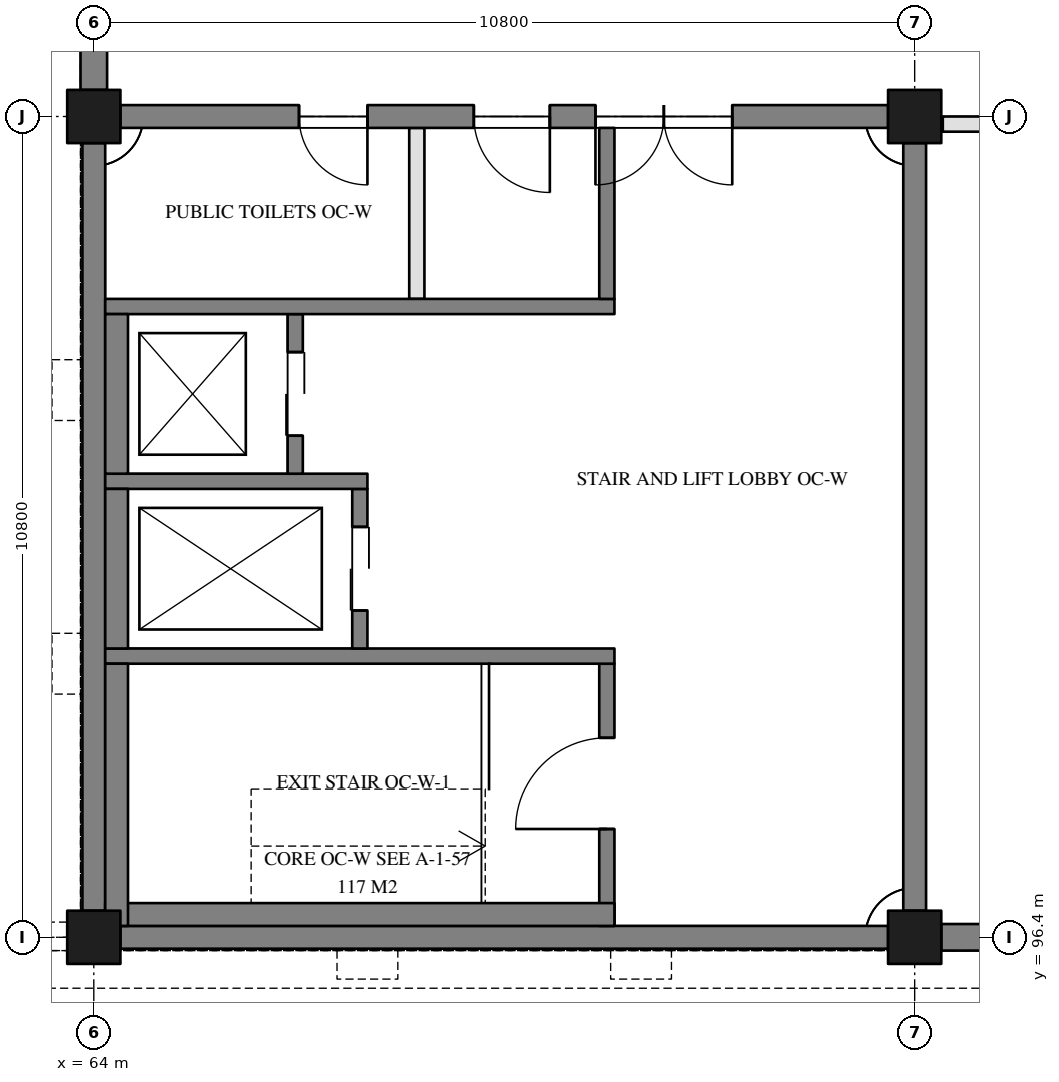
"""IFC4 building model, lengths in metres.
Left out: names, types, materials, properties, quantities, classifications, styles, units other than length and angle.
Written with IfcOpenShell. Run it as: python <this file> out.ifc"""

import sys

from ifc_helpers import new_model, si_unit, direction, frame, frame_2d, origin, origin_2d, place, context, subcontext, project, spatial, rectangle, extrude, element, fill, save


model = new_model("IFC4")
c1 = context("Model", 3, precision=1e-05, world=origin(), true_north=direction((0.0, 1.0)))
c2 = subcontext(c1, "Body", "Model", "MODEL_VIEW")
j1 = project(units=[si_unit("LENGTHUNIT", "METRE"), si_unit("PLANEANGLEUNIT", "RADIAN")], contexts=[c1])
p1 = place(None, origin())
s1 = spatial("IfcSite", under=j1, at=p1, CompositionType="ELEMENT")
p2 = place(p1, origin())
s2 = spatial("IfcBuilding", under=s1, at=p2, CompositionType="ELEMENT")
p3 = place(p2, frame((0.0, 0.0, 24.3)))
s3 = spatial("IfcBuildingStorey", under=s2, at=p3, CompositionType="ELEMENT", Elevation=24.3)
for number, where, z_axis, x_axis in (
    (1, (64.0, 96.4, 0.0), (0.0, 0.0, 1.0), (1.0, 0.0, 0.0)),
    (2, (64.0, 107.2, 0.0), (0.0, 0.0, 1.0), (1.0, 0.0, 0.0)),
    (3, (74.8, 96.4, 0.0), (0.0, 0.0, 1.0), (1.0, 0.0, 0.0)),
    (4, (74.8, 107.2, 0.0), (0.0, 0.0, 1.0), (1.0, 0.0, 0.0)),
):
    element("IfcColumn", number, at=place(p3, frame(where, z_axis=z_axis, x_axis=x_axis)), inside=s3, PredefinedType="COLUMN", context=c2, shape_type="SweptSolid", body=[
        extrude(rectangle(XDim=0.7, YDim=0.7, at=origin_2d()), origin(), (0.0, 0.0, 1.0), 3.9),
    ])
p4 = place(p3, frame((64.35, 96.4, 0.0), z_axis=(0.0, 0.0, 1.0), x_axis=(1.0, 0.0, 0.0)))
e5 = element("IfcWall", 5, at=p4, inside=s3, PredefinedType="SOLIDWALL", context=c2, shape_type="SweptSolid", body=[
    extrude(rectangle(XDim=10.1, YDim=0.3, at=frame_2d((5.05, 0.0))), origin(), (0.0, 0.0, 1.0), 3.9),
])
p5 = place(p3, frame((74.8, 96.75, 0.0), z_axis=(0.0, 0.0, 1.0), x_axis=(0.0, 1.0, 0.0)))
e6 = element("IfcWall", 6, at=p5, inside=s3, PredefinedType="SOLIDWALL", context=c2, shape_type="SweptSolid", body=[
    extrude(rectangle(XDim=10.1, YDim=0.3, at=frame_2d((5.05, 0.0))), origin(), (0.0, 0.0, 1.0), 3.9),
])
p6 = place(p3, frame((74.45, 107.2, 0.0), z_axis=(0.0, 0.0, 1.0), x_axis=(-1.0, 0.0, 0.0)))
e7 = element("IfcWall", 7, at=p6, inside=s3, PredefinedType="SOLIDWALL", context=c2, shape_type="SweptSolid", body=[
    extrude(rectangle(XDim=10.1, YDim=0.3, at=frame_2d((5.05, 0.0))), origin(), (0.0, 0.0, 1.0), 3.9),
])
p7 = place(p6, frame((2.05, 0.0, 0.0)))
e8 = element("IfcOpeningElement", 8, at=p7, cuts=e7, PredefinedType="OPENING", context=c2, shape_type="SweptSolid", body=[
    extrude(rectangle(XDim=1.8, YDim=2.1, at=frame_2d((0.9, 1.05))), frame((0.0, 0.16, 0.0), z_axis=(0.0, -1.0, 0.0), x_axis=(1.0, 0.0, 0.0)), (0.0, 0.0, 1.0), 0.32),
])
p8 = place(p6, frame((4.45, 0.0, 0.0)))
e9 = element("IfcOpeningElement", 9, at=p8, cuts=e7, PredefinedType="OPENING", context=c2, shape_type="SweptSolid", body=[
    extrude(rectangle(XDim=1.0, YDim=2.1, at=frame_2d((0.5, 1.05))), frame((0.0, 0.16, 0.0), z_axis=(0.0, -1.0, 0.0), x_axis=(1.0, 0.0, 0.0)), (0.0, 0.0, 1.0), 0.32),
])
p9 = place(p6, frame((6.85, 0.0, 0.0)))
e10 = element("IfcOpeningElement", 10, at=p9, cuts=e7, PredefinedType="OPENING", context=c2, shape_type="SweptSolid", body=[
    extrude(rectangle(XDim=0.9, YDim=2.1, at=frame_2d((0.45, 1.05))), frame((0.0, 0.16, 0.0), z_axis=(0.0, -1.0, 0.0), x_axis=(1.0, 0.0, 0.0)), (0.0, 0.0, 1.0), 0.32),
])
p10 = place(p3, frame((64.0, 106.85, 0.0), z_axis=(0.0, 0.0, 1.0), x_axis=(0.0, -1.0, 0.0)))
e11 = element("IfcWall", 11, at=p10, inside=s3, PredefinedType="SOLIDWALL", context=c2, shape_type="SweptSolid", body=[
    extrude(rectangle(XDim=10.1, YDim=0.3, at=frame_2d((5.05, 0.0))), origin(), (0.0, 0.0, 1.0), 3.9),
])
p11 = place(p3, frame((75.15, 96.4, 0.0), z_axis=(0.0, 0.0, 1.0), x_axis=(1.0, 0.0, 0.0)))
e12 = element("IfcWall", 12, at=p11, inside=s3, PredefinedType="SOLIDWALL", context=c2, shape_type="SweptSolid", body=[
    extrude(rectangle(XDim=10.1, YDim=0.35, at=frame_2d((5.05, 0.0))), origin(), (0.0, 0.0, 1.0), 2.95),
])
p12 = place(p11, frame((0.85, 0.0, 0.9)))
e13 = element("IfcOpeningElement", 13, at=p12, cuts=e12, PredefinedType="OPENING", context=c2, shape_type="SweptSolid", body=[
    extrude(rectangle(XDim=1.2, YDim=1.2, at=frame_2d((0.6, 0.6))), frame((0.0, 0.185, 0.0), z_axis=(0.0, -1.0, 0.0), x_axis=(1.0, 0.0, 0.0)), (0.0, 0.0, 1.0), 0.37),
])
p13 = place(p11, frame((4.45, 0.0, 0.9)))
e14 = element("IfcOpeningElement", 14, at=p13, cuts=e12, PredefinedType="OPENING", context=c2, shape_type="SweptSolid", body=[
    extrude(rectangle(XDim=1.2, YDim=1.2, at=frame_2d((0.6, 0.6))), frame((0.0, 0.185, 0.0), z_axis=(0.0, -1.0, 0.0), x_axis=(1.0, 0.0, 0.0)), (0.0, 0.0, 1.0), 0.37),
])
p14 = place(p11, frame((8.05, 0.0, 0.9)))
e15 = element("IfcOpeningElement", 15, at=p14, cuts=e12, PredefinedType="OPENING", context=c2, shape_type="SweptSolid", body=[
    extrude(rectangle(XDim=1.2, YDim=1.2, at=frame_2d((0.6, 0.6))), frame((0.0, 0.185, 0.0), z_axis=(0.0, -1.0, 0.0), x_axis=(1.0, 0.0, 0.0)), (0.0, 0.0, 1.0), 0.37),
])
p15 = place(p3, frame((64.0, 107.55, 0.0), z_axis=(0.0, 0.0, 1.0), x_axis=(0.0, 1.0, 0.0)))
e16 = element("IfcWall", 16, at=p15, inside=s3, PredefinedType="SOLIDWALL", context=c2, shape_type="SweptSolid", body=[
    extrude(rectangle(XDim=3.85, YDim=0.35, at=frame_2d((1.925, 0.0))), origin(), (0.0, 0.0, 1.0), 2.95),
])
p16 = place(p15, frame((0.85, 0.0, 0.9)))
e17 = element("IfcOpeningElement", 17, at=p16, cuts=e16, PredefinedType="OPENING", context=c2, shape_type="SweptSolid", body=[
    extrude(rectangle(XDim=1.2, YDim=1.2, at=frame_2d((0.6, 0.6))), frame((0.0, 0.185, 0.0), z_axis=(0.0, -1.0, 0.0), x_axis=(1.0, 0.0, 0.0)), (0.0, 0.0, 1.0), 0.37),
])
p17 = place(p3, frame((70.75, 96.55, 0.0), z_axis=(0.0, 0.0, 1.0), x_axis=(0.0, 1.0, 0.0)))
e18 = element("IfcWall", 18, at=p17, inside=s3, PredefinedType="SOLIDWALL", context=c2, shape_type="SweptSolid", body=[
    extrude(rectangle(XDim=3.45, YDim=0.2, at=frame_2d((1.725, 0.0))), origin(), (0.0, 0.0, 1.0), 3.9),
])
p18 = place(p17, frame((1.275, 0.0, 0.0)))
e19 = element("IfcOpeningElement", 19, at=p18, cuts=e18, PredefinedType="OPENING", context=c2, shape_type="SweptSolid", body=[
    extrude(rectangle(XDim=1.2, YDim=2.1, at=frame_2d((0.6, 1.05))), frame((0.0, 0.11, 0.0), z_axis=(0.0, -1.0, 0.0), x_axis=(1.0, 0.0, 0.0)), (0.0, 0.0, 1.0), 0.22),
])
p19 = place(p3, frame((70.85, 100.1, 0.0), z_axis=(0.0, 0.0, 1.0), x_axis=(-1.0, 0.0, 0.0)))
e20 = element("IfcWall", 20, at=p19, inside=s3, PredefinedType="SOLIDWALL", context=c2, shape_type="SweptSolid", body=[
    extrude(rectangle(XDim=6.7, YDim=0.2, at=frame_2d((3.35, 0.0))), origin(), (0.0, 0.0, 1.0), 3.9),
])
p20 = place(p3, frame((67.5, 100.2, 0.0), z_axis=(0.0, 0.0, 1.0), x_axis=(0.0, 1.0, 0.0)))
e21 = element("IfcWall", 21, at=p20, inside=s3, PredefinedType="SOLIDWALL", context=c2, shape_type="SweptSolid", body=[
    extrude(rectangle(XDim=2.1, YDim=0.2, at=frame_2d((1.05, 0.0))), origin(), (0.0, 0.0, 1.0), 3.9),
])
p21 = place(p20, frame((0.5, 0.0, 0.0)))
e22 = element("IfcOpeningElement", 22, at=p21, cuts=e21, PredefinedType="OPENING", context=c2, shape_type="SweptSolid", body=[
    extrude(rectangle(XDim=1.1, YDim=2.1, at=frame_2d((0.55, 1.05))), frame((0.0, 0.11, 0.0), z_axis=(0.0, -1.0, 0.0), x_axis=(1.0, 0.0, 0.0)), (0.0, 0.0, 1.0), 0.22),
])
p22 = place(p3, frame((67.6, 102.4, 0.0), z_axis=(0.0, 0.0, 1.0), x_axis=(-1.0, 0.0, 0.0)))
e23 = element("IfcWall", 23, at=p22, inside=s3, PredefinedType="SOLIDWALL", context=c2, shape_type="SweptSolid", body=[
    extrude(rectangle(XDim=3.45, YDim=0.2, at=frame_2d((1.725, 0.0))), origin(), (0.0, 0.0, 1.0), 3.9),
])
p23 = place(p3, frame((66.65, 102.5, 0.0), z_axis=(0.0, 0.0, 1.0), x_axis=(0.0, 1.0, 0.0)))
e24 = element("IfcWall", 24, at=p23, inside=s3, PredefinedType="SOLIDWALL", context=c2, shape_type="SweptSolid", body=[
    extrude(rectangle(XDim=2.1, YDim=0.2, at=frame_2d((1.05, 0.0))), origin(), (0.0, 0.0, 1.0), 3.9),
])
p24 = place(p23, frame((0.5, 0.0, 0.0)))
e25 = element("IfcOpeningElement", 25, at=p24, cuts=e24, PredefinedType="OPENING", context=c2, shape_type="SweptSolid", body=[
    extrude(rectangle(XDim=1.1, YDim=2.1, at=frame_2d((0.55, 1.05))), frame((0.0, 0.11, 0.0), z_axis=(0.0, -1.0, 0.0), x_axis=(1.0, 0.0, 0.0)), (0.0, 0.0, 1.0), 0.22),
])
p25 = place(p3, frame((70.85, 104.7, 0.0), z_axis=(0.0, 0.0, 1.0), x_axis=(-1.0, 0.0, 0.0)))
e26 = element("IfcWall", 26, at=p25, inside=s3, PredefinedType="SOLIDWALL", context=c2, shape_type="SweptSolid", body=[
    extrude(rectangle(XDim=6.7, YDim=0.2, at=frame_2d((3.35, 0.0))), origin(), (0.0, 0.0, 1.0), 3.9),
])
p26 = place(p3, frame((70.75, 104.8, 0.0), z_axis=(0.0, 0.0, 1.0), x_axis=(0.0, 1.0, 0.0)))
e27 = element("IfcWall", 27, at=p26, inside=s3, PredefinedType="SOLIDWALL", context=c2, shape_type="SweptSolid", body=[
    extrude(rectangle(XDim=2.25, YDim=0.2, at=frame_2d((1.125, 0.0))), origin(), (0.0, 0.0, 1.0), 3.9),
])
p27 = place(p3, frame((70.85, 96.7, -0.3), z_axis=(0.0, 0.0, 1.0), x_axis=(-1.0, 0.0, 0.0)))
e28 = element("IfcWall", 28, at=p27, inside=s3, PredefinedType="SOLIDWALL", context=c2, shape_type="SweptSolid", body=[
    extrude(rectangle(XDim=6.7, YDim=0.3, at=frame_2d((3.35, 0.0))), origin(), (0.0, 0.0, 1.0), 4.2),
])
p28 = place(p3, frame((64.3, 96.55, -0.3), z_axis=(0.0, 0.0, 1.0), x_axis=(0.0, 1.0, 0.0)))
e29 = element("IfcWall", 29, at=p28, inside=s3, PredefinedType="SOLIDWALL", context=c2, shape_type="SweptSolid", body=[
    extrude(rectangle(XDim=3.45, YDim=0.3, at=frame_2d((1.725, 0.0))), origin(), (0.0, 0.0, 1.0), 4.2),
])
for number, where, z_axis, x_axis in (
    (30, (64.3, 100.2, -0.3), (0.0, 0.0, 1.0), (0.0, 1.0, 0.0)),
    (31, (64.3, 102.5, -0.3), (0.0, 0.0, 1.0), (0.0, 1.0, 0.0)),
):
    element("IfcWall", number, at=place(p3, frame(where, z_axis=z_axis, x_axis=x_axis)), inside=s3, PredefinedType="SOLIDWALL", context=c2, shape_type="SweptSolid", body=[
        extrude(rectangle(XDim=2.1, YDim=0.3, at=frame_2d((1.05, 0.0))), origin(), (0.0, 0.0, 1.0), 4.2),
    ])
p29 = place(p3, frame((68.25, 104.8, 0.0), z_axis=(0.0, 0.0, 1.0), x_axis=(0.0, 1.0, 0.0)))
e32 = element("IfcWall", 32, at=p29, inside=s3, PredefinedType="PARTITIONING", context=c2, shape_type="SweptSolid", body=[
    extrude(rectangle(XDim=2.25, YDim=0.2, at=frame_2d((1.125, 0.0))), origin(), (0.0, 0.0, 1.0), 3.9),
])
p30 = place(p3, frame((75.17, 107.1, 0.0), z_axis=(0.0, 0.0, 1.0), x_axis=(1.0, 0.0, 0.0)))
e33 = element("IfcWall", 33, at=p30, inside=s3, PredefinedType="PARTITIONING", context=c2, shape_type="SweptSolid", body=[
    extrude(rectangle(XDim=10.06, YDim=0.2, at=frame_2d((5.03, 0.0))), origin(), (0.0, 0.0, 1.0), 3.75),
])
p31 = place(p21, frame((1.1, 0.0, 0.0), z_axis=(0.0, 0.0, 1.0), x_axis=(-1.0, 0.0, 0.0)))
e34 = element("IfcDoor", 34, at=p31, inside=s3, OperationType="DOUBLE_DOOR_SLIDING", PredefinedType="DOOR", context=c2, shape_type="SweptSolid", body=[
    extrude(rectangle(XDim=1.1, YDim=2.1, at=frame_2d((0.55, 1.05))), frame((0.0, 0.025, 0.0), z_axis=(0.0, -1.0, 0.0), x_axis=(1.0, 0.0, 0.0)), (0.0, 0.0, 1.0), 0.05),
])
fill(e22, e34)
p32 = place(p24, frame((1.1, 0.0, 0.0), z_axis=(0.0, 0.0, 1.0), x_axis=(-1.0, 0.0, 0.0)))
e35 = element("IfcDoor", 35, at=p32, inside=s3, OperationType="DOUBLE_DOOR_SLIDING", PredefinedType="DOOR", context=c2, shape_type="SweptSolid", body=[
    extrude(rectangle(XDim=1.1, YDim=2.1, at=frame_2d((0.55, 1.05))), frame((0.0, 0.025, 0.0), z_axis=(0.0, -1.0, 0.0), x_axis=(1.0, 0.0, 0.0)), (0.0, 0.0, 1.0), 0.05),
])
fill(e25, e35)
p33 = place(p18, frame((1.2, 0.0, 0.0), z_axis=(0.0, 0.0, 1.0), x_axis=(-1.0, 0.0, 0.0)))
e36 = element("IfcDoor", 36, at=p33, inside=s3, OperationType="SINGLE_SWING_LEFT", PredefinedType="DOOR", context=c2, shape_type="SweptSolid", body=[
    extrude(rectangle(XDim=1.2, YDim=2.1, at=frame_2d((0.6, 1.05))), frame((0.0, 0.025, 0.0), z_axis=(0.0, -1.0, 0.0), x_axis=(1.0, 0.0, 0.0)), (0.0, 0.0, 1.0), 0.05),
])
fill(e19, e36)
p34 = place(p7, frame((1.8, 0.0, 0.0), z_axis=(0.0, 0.0, 1.0), x_axis=(-1.0, 0.0, 0.0)))
e37 = element("IfcDoor", 37, at=p34, inside=s3, OperationType="DOUBLE_DOOR_DOUBLE_SWING", PredefinedType="DOOR", context=c2, shape_type="SweptSolid", body=[
    extrude(rectangle(XDim=1.8, YDim=2.1, at=frame_2d((0.9, 1.05))), frame((0.0, 0.025, 0.0), z_axis=(0.0, -1.0, 0.0), x_axis=(1.0, 0.0, 0.0)), (0.0, 0.0, 1.0), 0.05),
])
fill(e8, e37)
p35 = place(p8, origin())
e38 = element("IfcDoor", 38, at=p35, inside=s3, OperationType="SINGLE_SWING_LEFT", PredefinedType="DOOR", context=c2, shape_type="SweptSolid", body=[
    extrude(rectangle(XDim=1.0, YDim=2.1, at=frame_2d((0.5, 1.05))), frame((0.0, 0.025, 0.0), z_axis=(0.0, -1.0, 0.0), x_axis=(1.0, 0.0, 0.0)), (0.0, 0.0, 1.0), 0.05),
])
fill(e9, e38)
p36 = place(p9, origin())
e39 = element("IfcDoor", 39, at=p36, inside=s3, OperationType="SINGLE_SWING_RIGHT", PredefinedType="DOOR", context=c2, shape_type="SweptSolid", body=[
    extrude(rectangle(XDim=0.9, YDim=2.1, at=frame_2d((0.45, 1.05))), frame((0.0, 0.025, 0.0), z_axis=(0.0, -1.0, 0.0), x_axis=(1.0, 0.0, 0.0)), (0.0, 0.0, 1.0), 0.05),
])
fill(e10, e39)
save(model, sys.argv[1])
